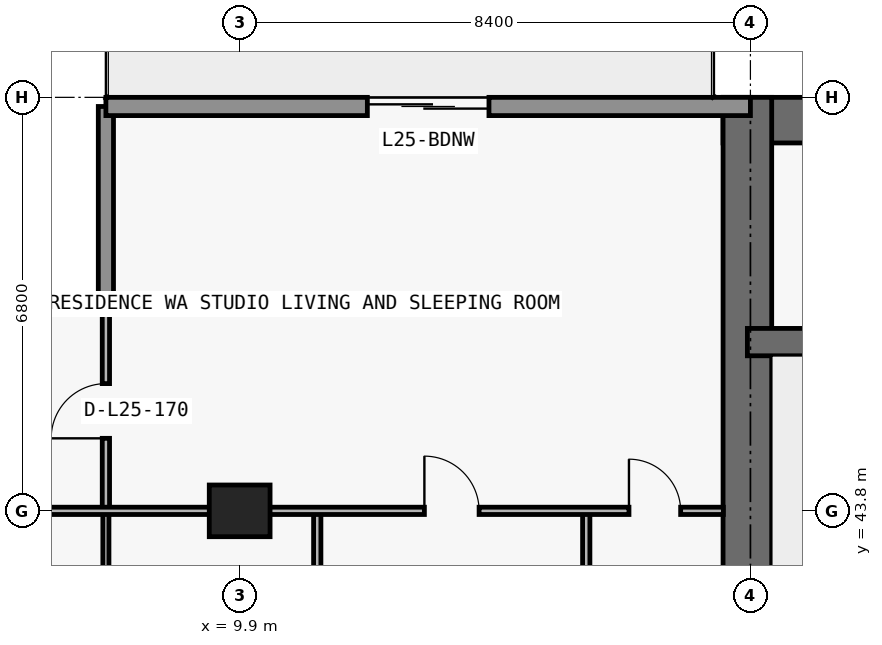
"""IFC4 building model, lengths in metres.
Left out: names, types, materials, properties, quantities, classifications, styles, units other than length and angle.
Written with IfcOpenShell. Run it as: python <this file> out.ifc"""

import sys

from ifc_helpers import new_model, si_unit, direction, frame, frame_2d, origin, origin_2d, place, context, subcontext, project, spatial, rectangle, extrude, element, fill, save


model = new_model("IFC4")
c1 = context("Model", 3, precision=1e-05, world=origin(), true_north=direction((0.0, 1.0)))
c2 = subcontext(c1, "Body", "Model", "MODEL_VIEW")
j1 = project(units=[si_unit("LENGTHUNIT", "METRE"), si_unit("PLANEANGLEUNIT", "RADIAN")], contexts=[c1])
p1 = place(None, origin())
s1 = spatial("IfcSite", under=j1, at=p1, CompositionType="ELEMENT")
p2 = place(p1, origin())
s2 = spatial("IfcBuilding", under=s1, at=p2, CompositionType="ELEMENT")
p3 = place(p2, frame((0.0, 0.0, 94.5)))
s3 = spatial("IfcBuildingStorey", under=s2, at=p3, CompositionType="ELEMENT", Elevation=94.5)
p4 = place(p3, frame((9.9, 43.8, 0.0), z_axis=(0.0, 0.0, 1.0), x_axis=(1.0, 0.0, 0.0)))
e1 = element("IfcColumn", 1, at=p4, inside=s3, PredefinedType="COLUMN", context=c2, shape_type="SweptSolid", body=[
    extrude(rectangle(XDim=1.0, YDim=0.85, at=origin_2d()), origin(), (0.0, 0.0, 1.0), 3.0),
])
p5 = place(p3, frame((17.85, 50.225, 0.0), z_axis=(0.0, 0.0, 1.0), x_axis=(1.0, 0.0, 0.0)))
e2 = element("IfcWall", 2, at=p5, inside=s3, PredefinedType="SHEAR", context=c2, shape_type="SweptSolid", body=[
    extrude(rectangle(XDim=42.1, YDim=0.75, at=frame_2d((21.05, 0.0))), origin(), (0.0, 0.0, 1.0), 3.0),
])
p6 = place(p3, frame((18.25, 36.55, 0.0), z_axis=(0.0, 0.0, 1.0), x_axis=(0.0, 1.0, 0.0)))
e3 = element("IfcWall", 3, at=p6, inside=s3, PredefinedType="SHEAR", context=c2, shape_type="SweptSolid", body=[
    extrude(rectangle(XDim=14.05, YDim=0.8, at=frame_2d((7.025, 0.0))), origin(), (0.0, 0.0, 1.0), 3.0),
])
p7 = place(p3, frame((18.25, 46.575, 0.0), z_axis=(0.0, 0.0, 1.0), x_axis=(1.0, 0.0, 0.0)))
e4 = element("IfcWall", 4, at=p7, inside=s3, PredefinedType="SHEAR", context=c2, shape_type="SweptSolid", body=[
    extrude(rectangle(XDim=41.3, YDim=0.45, at=frame_2d((20.65, 0.0))), origin(), (0.0, 0.0, 1.0), 3.0),
])
p8 = place(p7, frame((7.625, 0.0, 0.0)))
e5 = element("IfcOpeningElement", 5, at=p8, cuts=e4, PredefinedType="OPENING", context=c2, shape_type="SweptSolid", body=[
    extrude(rectangle(XDim=1.05, YDim=2.15, at=frame_2d((0.525, 1.075))), frame((0.0, 0.235, 0.0), z_axis=(0.0, -1.0, 0.0), x_axis=(1.0, 0.0, 0.0)), (0.0, 0.0, 1.0), 0.47),
])
p9 = place(p7, frame((32.675, 0.0, 0.0)))
e6 = element("IfcOpeningElement", 6, at=p9, cuts=e4, PredefinedType="OPENING", context=c2, shape_type="SweptSolid", body=[
    extrude(rectangle(XDim=1.05, YDim=2.15, at=frame_2d((0.525, 1.075))), frame((0.0, 0.235, 0.0), z_axis=(0.0, -1.0, 0.0), x_axis=(1.0, 0.0, 0.0)), (0.0, 0.0, 1.0), 0.47),
])
p10 = place(p3, frame((4.05, 47.2, 0.0), z_axis=(0.0, 0.0, 1.0), x_axis=(1.0, 0.0, 0.0)))
e7 = element("IfcWall", 7, at=p10, inside=s3, PredefinedType="ELEMENTEDWALL", context=c2, shape_type="SweptSolid", body=[
    extrude(rectangle(XDim=3.65, YDim=0.25, at=frame_2d((1.825, 0.0))), origin(), (0.0, 0.0, 1.0), 3.0),
])
p11 = place(p3, frame((7.7, 47.2, 0.0), z_axis=(0.0, 0.0, 1.0), x_axis=(0.0, 1.0, 0.0)))
e8 = element("IfcWall", 8, at=p11, inside=s3, PredefinedType="ELEMENTEDWALL", context=c2, shape_type="SweptSolid", body=[
    extrude(rectangle(XDim=3.25, YDim=0.25, at=frame_2d((1.625, 0.0))), origin(), (0.0, 0.0, 1.0), 3.0),
])
p12 = place(p3, frame((7.7, 50.45, 0.0), z_axis=(0.0, 0.0, 1.0), x_axis=(1.0, 0.0, 0.0)))
e9 = element("IfcWall", 9, at=p12, inside=s3, PredefinedType="STANDARD", context=c2, shape_type="SweptSolid", body=[
    extrude(rectangle(XDim=10.6, YDim=0.3, at=frame_2d((5.3, 0.0))), origin(), (0.0, 0.0, 1.0), 3.0),
])
p13 = place(p12, frame((4.3, 0.0, 0.0)))
e10 = element("IfcOpeningElement", 10, at=p13, cuts=e9, PredefinedType="OPENING", context=c2, shape_type="SweptSolid", body=[
    extrude(rectangle(XDim=2.0, YDim=2.3, at=frame_2d((1.0, 1.15))), frame((0.0, 0.16, 0.0), z_axis=(0.0, -1.0, 0.0), x_axis=(1.0, 0.0, 0.0)), (0.0, 0.0, 1.0), 0.32),
])
p14 = place(p3, frame((7.7, 36.955, 0.0), z_axis=(0.0, 0.0, 1.0), x_axis=(0.0, 1.0, 0.0)))
e11 = element("IfcWall", 11, at=p14, inside=s3, PredefinedType="MOVABLE", context=c2, shape_type="SweptSolid", body=[
    extrude(rectangle(XDim=6.845, YDim=0.1, at=frame_2d((3.422, 0.0))), origin(), (0.0, 0.0, 1.0), 3.0),
])
p15 = place(p14, frame((2.972, 0.0, 0.0)))
e12 = element("IfcOpeningElement", 12, at=p15, cuts=e11, PredefinedType="OPENING", context=c2, shape_type="SweptSolid", body=[
    extrude(rectangle(XDim=0.9, YDim=2.15, at=frame_2d((0.45, 1.075))), frame((0.0, 0.06, 0.0), z_axis=(0.0, -1.0, 0.0), x_axis=(1.0, 0.0, 0.0)), (0.0, 0.0, 1.0), 0.12),
])
p16 = place(p3, frame((7.7, 43.805, 0.0), z_axis=(0.0, 0.0, 1.0), x_axis=(0.0, 1.0, 0.0)))
e13 = element("IfcWall", 13, at=p16, inside=s3, PredefinedType="PARTITIONING", context=c2, shape_type="SweptSolid", body=[
    extrude(rectangle(XDim=3.275, YDim=0.12, at=frame_2d((1.638, 0.0))), origin(), (0.0, 0.0, 1.0), 3.0),
])
p17 = place(p16, frame((1.188, 0.0, 0.0)))
e14 = element("IfcOpeningElement", 14, at=p17, cuts=e13, PredefinedType="OPENING", context=c2, shape_type="SweptSolid", body=[
    extrude(rectangle(XDim=0.9, YDim=2.15, at=frame_2d((0.45, 1.075))), frame((0.0, 0.07, 0.0), z_axis=(0.0, -1.0, 0.0), x_axis=(1.0, 0.0, 0.0)), (0.0, 0.0, 1.0), 0.14),
])
p18 = place(p3, frame((11.176, 36.95, 0.0), z_axis=(0.0, 0.0, 1.0), x_axis=(0.0, 1.0, 0.0)))
e15 = element("IfcWall", 15, at=p18, inside=s3, PredefinedType="PARTITIONING", context=c2, shape_type="SweptSolid", body=[
    extrude(rectangle(XDim=6.85, YDim=0.12, at=frame_2d((3.425, 0.0))), origin(), (0.0, 0.0, 1.0), 3.0),
])
p19 = place(p18, frame((2.975, 0.0, 0.0)))
e16 = element("IfcOpeningElement", 16, at=p19, cuts=e15, PredefinedType="OPENING", context=c2, shape_type="SweptSolid", body=[
    extrude(rectangle(XDim=0.9, YDim=2.15, at=frame_2d((0.45, 1.075))), frame((0.0, 0.07, 0.0), z_axis=(0.0, -1.0, 0.0), x_axis=(1.0, 0.0, 0.0)), (0.0, 0.0, 1.0), 0.14),
])
p20 = place(p3, frame((15.6, 36.95, 0.0), z_axis=(0.0, 0.0, 1.0), x_axis=(0.0, 1.0, 0.0)))
e17 = element("IfcWall", 17, at=p20, inside=s3, PredefinedType="PARTITIONING", context=c2, shape_type="SweptSolid", body=[
    extrude(rectangle(XDim=6.85, YDim=0.12, at=frame_2d((3.425, 0.0))), origin(), (0.0, 0.0, 1.0), 3.0),
])
p21 = place(p20, frame((1.219, 0.0, 0.0)))
e18 = element("IfcOpeningElement", 18, at=p21, cuts=e17, PredefinedType="OPENING", context=c2, shape_type="SweptSolid", body=[
    extrude(rectangle(XDim=0.85, YDim=2.1, at=frame_2d((0.425, 1.05))), frame((0.0, 0.07, 0.0), z_axis=(0.0, -1.0, 0.0), x_axis=(1.0, 0.0, 0.0)), (0.0, 0.0, 1.0), 0.14),
])
p22 = place(p3, frame((4.195, 43.8, 0.0), z_axis=(0.0, 0.0, 1.0), x_axis=(1.0, 0.0, 0.0)))
e19 = element("IfcWall", 19, at=p22, inside=s3, PredefinedType="PARTITIONING", context=c2, shape_type="SweptSolid", body=[
    extrude(rectangle(XDim=13.66, YDim=0.12, at=frame_2d((6.83, 0.0))), origin(), (0.0, 0.0, 1.0), 2.289),
])
p23 = place(p22, frame((8.743, 0.0, 0.0)))
e20 = element("IfcOpeningElement", 20, at=p23, cuts=e19, PredefinedType="OPENING", context=c2, shape_type="SweptSolid", body=[
    extrude(rectangle(XDim=0.9, YDim=2.15, at=frame_2d((0.45, 1.075))), frame((0.0, 0.07, 0.0), z_axis=(0.0, -1.0, 0.0), x_axis=(1.0, 0.0, 0.0)), (0.0, 0.0, 1.0), 0.14),
])
p24 = place(p22, frame((12.107, 0.0, 0.0)))
e21 = element("IfcOpeningElement", 21, at=p24, cuts=e19, PredefinedType="OPENING", context=c2, shape_type="SweptSolid", body=[
    extrude(rectangle(XDim=0.85, YDim=2.1, at=frame_2d((0.425, 1.05))), frame((0.0, 0.07, 0.0), z_axis=(0.0, -1.0, 0.0), x_axis=(1.0, 0.0, 0.0)), (0.0, 0.0, 1.0), 0.14),
])
p25 = place(p13, origin())
e22 = element("IfcDoor", 22, at=p25, inside=s3, OperationType="DOUBLE_DOOR_SLIDING", PredefinedType="DOOR", context=c2, shape_type="SweptSolid", body=[
    extrude(rectangle(XDim=2.0, YDim=2.3, at=frame_2d((1.0, 1.15))), frame((0.0, 0.025, 0.0), z_axis=(0.0, -1.0, 0.0), x_axis=(1.0, 0.0, 0.0)), (0.0, 0.0, 1.0), 0.05),
])
fill(e10, e22)
p26 = place(p23, origin())
e23 = element("IfcDoor", 23, at=p26, inside=s3, OperationType="SINGLE_SWING_LEFT", PredefinedType="DOOR", context=c2, shape_type="SweptSolid", body=[
    extrude(rectangle(XDim=0.9, YDim=2.15, at=frame_2d((0.45, 1.075))), frame((0.0, 0.025, 0.0), z_axis=(0.0, -1.0, 0.0), x_axis=(1.0, 0.0, 0.0)), (0.0, 0.0, 1.0), 0.05),
])
fill(e20, e23)
p27 = place(p24, origin())
e24 = element("IfcDoor", 24, at=p27, inside=s3, OperationType="SINGLE_SWING_LEFT", PredefinedType="DOOR", context=c2, shape_type="SweptSolid", body=[
    extrude(rectangle(XDim=0.85, YDim=2.1, at=frame_2d((0.425, 1.05))), frame((0.0, 0.025, 0.0), z_axis=(0.0, -1.0, 0.0), x_axis=(1.0, 0.0, 0.0)), (0.0, 0.0, 1.0), 0.05),
])
fill(e21, e24)
p28 = place(p17, origin())
e25 = element("IfcDoor", 25, at=p28, inside=s3, OperationType="SINGLE_SWING_LEFT", PredefinedType="DOOR", context=c2, shape_type="SweptSolid", body=[
    extrude(rectangle(XDim=0.9, YDim=2.15, at=frame_2d((0.45, 1.075))), frame((0.0, 0.025, 0.0), z_axis=(0.0, -1.0, 0.0), x_axis=(1.0, 0.0, 0.0)), (0.0, 0.0, 1.0), 0.05),
])
fill(e14, e25)
save(model, sys.argv[1])
